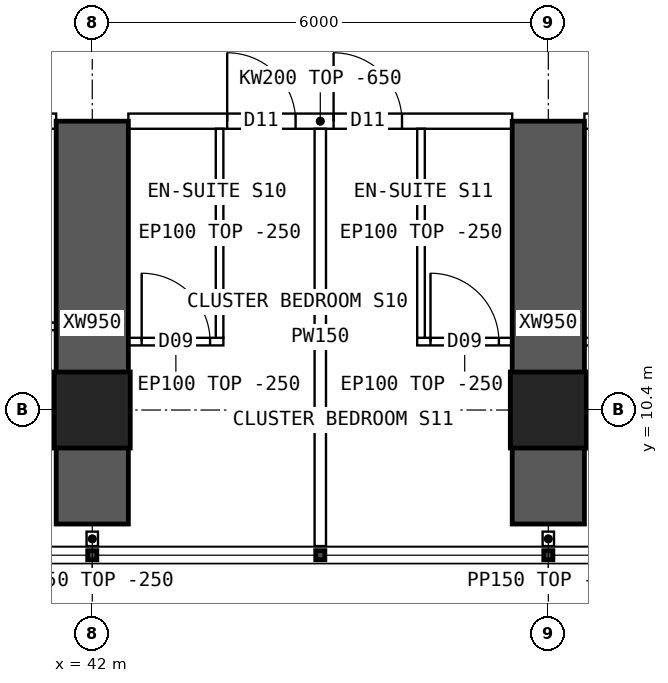
"""IFC4 building model, lengths in metres.
Left out: names, types, materials, properties, quantities, classifications, styles, units other than length and angle.
Written with IfcOpenShell. Run it as: python <this file> out.ifc"""

import sys

from ifc_helpers import new_model, si_unit, direction, frame, frame_2d, origin, origin_2d, place, context, subcontext, project, spatial, polyline, rectangle, hollow_rectangle, outline, extrude, element, fill, save


model = new_model("IFC4")
c1 = context("Model", 3, precision=1e-05, world=origin(), true_north=direction((0.0, 1.0)))
c2 = subcontext(c1, "Body", "Model", "MODEL_VIEW")
j1 = project(units=[si_unit("LENGTHUNIT", "METRE"), si_unit("PLANEANGLEUNIT", "RADIAN")], contexts=[c1])
p1 = place(None, origin())
s1 = spatial("IfcSite", under=j1, at=p1, CompositionType="ELEMENT")
p2 = place(p1, origin())
s2 = spatial("IfcBuilding", under=s1, at=p2, CompositionType="ELEMENT")
p3 = place(p2, frame((0.0, 0.0, 103.15)))
s3 = spatial("IfcBuildingStorey", under=s2, at=p3, CompositionType="ELEMENT", Elevation=103.15)
for number, where, z_axis, x_axis in (
    (1, (42.0, 10.4, 0.0), (0.0, 0.0, 1.0), (1.0, 0.0, 0.0)),
    (2, (48.0, 10.4, 0.0), (0.0, 0.0, 1.0), (1.0, 0.0, 0.0)),
):
    element("IfcColumn", number, at=place(p3, frame(where, z_axis=z_axis, x_axis=x_axis)), inside=s3, PredefinedType="COLUMN", context=c2, shape_type="SweptSolid", body=[
        extrude(hollow_rectangle(XDim=1.0, YDim=1.0, WallThickness=0.1, at=origin_2d()), origin(), (0.0, 0.0, 1.0), 3.75),
    ])
for number, where, z_axis, x_axis in (
    (3, (42.0, 8.9, 0.0), (0.0, 0.0, 1.0), (0.0, 1.0, 0.0)),
    (4, (48.0, 8.9, 0.0), (0.0, 0.0, 1.0), (0.0, 1.0, 0.0)),
):
    element("IfcWall", number, at=place(p3, frame(where, z_axis=z_axis, x_axis=x_axis)), inside=s3, PredefinedType="SHEAR", context=c2, shape_type="SweptSolid", body=[
        extrude(rectangle(XDim=5.3, YDim=0.95, at=frame_2d((2.65, 0.0))), origin(), (0.0, 0.0, 1.0), 3.75),
    ])
p4 = place(p3, frame((36.475, 14.2, 0.0), z_axis=(0.0, 0.0, 1.0), x_axis=(1.0, 0.0, 0.0)))
e5 = element("IfcWall", 5, at=p4, inside=s3, PredefinedType="SOLIDWALL", context=c2, shape_type="SweptSolid", body=[
    extrude(outline(polyline([(0.0, 0.0), (5.05, 0.0), (5.05, 3.1), (0.0, 3.1), (0.0, 0.0)])), frame((0.0, 0.1, 0.0), z_axis=(0.0, -1.0, 0.0), x_axis=(1.0, 0.0, 0.0)), (0.0, 0.0, 1.0), 0.2),
])
p5 = place(p4, frame((0.3, 0.0, 0.0)))
e6 = element("IfcOpeningElement", 6, at=p5, cuts=e5, PredefinedType="OPENING", context=c2, shape_type="SweptSolid", body=[
    extrude(rectangle(XDim=1.0, YDim=2.1, at=frame_2d((0.5, 1.05))), frame((0.0, 0.11, 0.0), z_axis=(0.0, -1.0, 0.0), x_axis=(1.0, 0.0, 0.0)), (0.0, 0.0, 1.0), 0.22),
])
p6 = place(p3, frame((42.475, 14.2, 0.0), z_axis=(0.0, 0.0, 1.0), x_axis=(1.0, 0.0, 0.0)))
e7 = element("IfcWall", 7, at=p6, inside=s3, PredefinedType="SOLIDWALL", context=c2, shape_type="SweptSolid", body=[
    extrude(outline(polyline([(0.0, 0.0), (5.05, 0.0), (5.05, 3.1), (0.0, 3.1), (0.0, 0.0)])), frame((0.0, 0.1, 0.0), z_axis=(0.0, -1.0, 0.0), x_axis=(1.0, 0.0, 0.0)), (0.0, 0.0, 1.0), 0.2),
])
p7 = place(p6, frame((1.3, 0.0, 0.0)))
e8 = element("IfcOpeningElement", 8, at=p7, cuts=e7, PredefinedType="OPENING", context=c2, shape_type="SweptSolid", body=[
    extrude(rectangle(XDim=0.9, YDim=2.1, at=frame_2d((0.45, 1.05))), frame((0.0, 0.11, 0.0), z_axis=(0.0, -1.0, 0.0), x_axis=(1.0, 0.0, 0.0)), (0.0, 0.0, 1.0), 0.22),
])
p8 = place(p6, frame((2.7, 0.0, 0.0)))
e9 = element("IfcOpeningElement", 9, at=p8, cuts=e7, PredefinedType="OPENING", context=c2, shape_type="SweptSolid", body=[
    extrude(rectangle(XDim=0.9, YDim=2.1, at=frame_2d((0.45, 1.05))), frame((0.0, 0.11, 0.0), z_axis=(0.0, -1.0, 0.0), x_axis=(1.0, 0.0, 0.0)), (0.0, 0.0, 1.0), 0.22),
])
p9 = place(p3, frame((48.475, 14.2, 0.0), z_axis=(0.0, 0.0, 1.0), x_axis=(1.0, 0.0, 0.0)))
e10 = element("IfcWall", 10, at=p9, inside=s3, PredefinedType="SOLIDWALL", context=c2, shape_type="SweptSolid", body=[
    extrude(outline(polyline([(0.0, 0.0), (5.05, 0.0), (5.05, 3.1), (0.0, 3.1), (0.0, 0.0)])), frame((0.0, 0.1, 0.0), z_axis=(0.0, -1.0, 0.0), x_axis=(1.0, 0.0, 0.0)), (0.0, 0.0, 1.0), 0.2),
])
p10 = place(p9, frame((1.3, 0.0, 0.0)))
e11 = element("IfcOpeningElement", 11, at=p10, cuts=e10, PredefinedType="OPENING", context=c2, shape_type="SweptSolid", body=[
    extrude(rectangle(XDim=0.9, YDim=2.1, at=frame_2d((0.45, 1.05))), frame((0.0, 0.11, 0.0), z_axis=(0.0, -1.0, 0.0), x_axis=(1.0, 0.0, 0.0)), (0.0, 0.0, 1.0), 0.22),
])
p11 = place(p9, frame((2.7, 0.0, 0.0)))
e12 = element("IfcOpeningElement", 12, at=p11, cuts=e10, PredefinedType="OPENING", context=c2, shape_type="SweptSolid", body=[
    extrude(rectangle(XDim=0.9, YDim=2.1, at=frame_2d((0.45, 1.05))), frame((0.0, 0.11, 0.0), z_axis=(0.0, -1.0, 0.0), x_axis=(1.0, 0.0, 0.0)), (0.0, 0.0, 1.0), 0.22),
])
p12 = place(p3, frame((38.875, 11.5, 0.0), z_axis=(0.0, 0.0, 1.0), x_axis=(1.0, 0.0, 0.0)))
e13 = element("IfcWall", 13, at=p12, inside=s3, PredefinedType="PARTITIONING", context=c2, shape_type="SweptSolid", body=[
    extrude(rectangle(XDim=2.65, YDim=0.1, at=frame_2d((1.325, 0.0))), origin(), (0.0, 0.0, 1.0), 3.5),
])
p13 = place(p3, frame((45.0, 8.61, 0.0), z_axis=(0.0, 0.0, 1.0), x_axis=(0.0, 1.0, 0.0)))
e14 = element("IfcWall", 14, at=p13, inside=s3, PredefinedType="PARTITIONING", context=c2, shape_type="SweptSolid", body=[
    extrude(outline(polyline([(0.0, 0.0), (5.49, 0.0), (5.49, 3.1), (5.442, 3.1), (5.44, 3.5), (1.992, 3.5), (1.99, 3.1), (1.592, 3.1), (1.59, 3.5), (0.0, 3.5), (0.0, 0.0)])), frame((0.0, 0.075, 0.0), z_axis=(0.0, -1.0, 0.0), x_axis=(1.0, 0.0, 0.0)), (0.0, 0.0, 1.0), 0.15),
])
p14 = place(p3, frame((43.725, 11.3, 0.0), z_axis=(0.0, 0.0, 1.0), x_axis=(-1.0, 0.0, 0.0)))
e15 = element("IfcWall", 15, at=p14, inside=s3, PredefinedType="PARTITIONING", context=c2, shape_type="SweptSolid", body=[
    extrude(rectangle(XDim=1.25, YDim=0.1, at=frame_2d((0.625, 0.0))), origin(), (0.0, 0.0, 1.0), 3.5),
])
p15 = place(p14, frame((0.175, 0.0, 0.0)))
e16 = element("IfcOpeningElement", 16, at=p15, cuts=e15, PredefinedType="OPENING", context=c2, shape_type="SweptSolid", body=[
    extrude(rectangle(XDim=0.9, YDim=2.1, at=frame_2d((0.45, 1.05))), frame((0.0, 0.06, 0.0), z_axis=(0.0, -1.0, 0.0), x_axis=(1.0, 0.0, 0.0)), (0.0, 0.0, 1.0), 0.12),
])
p16 = place(p3, frame((43.675, 11.35, 0.0), z_axis=(0.0, 0.0, 1.0), x_axis=(0.0, 1.0, 0.0)))
e17 = element("IfcWall", 17, at=p16, inside=s3, PredefinedType="PARTITIONING", context=c2, shape_type="SweptSolid", body=[
    extrude(outline(polyline([(0.0, 0.0), (2.75, 0.0), (2.75, 3.1), (2.702, 3.1), (2.7, 3.5), (0.0, 3.5), (0.0, 0.0)])), frame((0.0, 0.05, 0.0), z_axis=(0.0, -1.0, 0.0), x_axis=(1.0, 0.0, 0.0)), (0.0, 0.0, 1.0), 0.1),
])
p17 = place(p3, frame((47.525, 11.3, 0.0), z_axis=(0.0, 0.0, 1.0), x_axis=(-1.0, 0.0, 0.0)))
e18 = element("IfcWall", 18, at=p17, inside=s3, PredefinedType="PARTITIONING", context=c2, shape_type="SweptSolid", body=[
    extrude(rectangle(XDim=1.25, YDim=0.1, at=frame_2d((0.625, 0.0))), origin(), (0.0, 0.0, 1.0), 3.5),
])
p18 = place(p17, frame((0.175, 0.0, 0.0)))
e19 = element("IfcOpeningElement", 19, at=p18, cuts=e18, PredefinedType="OPENING", context=c2, shape_type="SweptSolid", body=[
    extrude(rectangle(XDim=0.9, YDim=2.1, at=frame_2d((0.45, 1.05))), frame((0.0, 0.06, 0.0), z_axis=(0.0, -1.0, 0.0), x_axis=(1.0, 0.0, 0.0)), (0.0, 0.0, 1.0), 0.12),
])
p19 = place(p3, frame((46.325, 11.35, 0.0), z_axis=(0.0, 0.0, 1.0), x_axis=(0.0, 1.0, 0.0)))
e20 = element("IfcWall", 20, at=p19, inside=s3, PredefinedType="PARTITIONING", context=c2, shape_type="SweptSolid", body=[
    extrude(outline(polyline([(0.0, 0.0), (2.75, 0.0), (2.75, 3.1), (2.702, 3.1), (2.7, 3.5), (0.0, 3.5), (0.0, 0.0)])), frame((0.0, 0.05, 0.0), z_axis=(0.0, -1.0, 0.0), x_axis=(1.0, 0.0, 0.0)), (0.0, 0.0, 1.0), 0.1),
])
p20 = place(p3, frame((49.725, 11.3, 0.0), z_axis=(0.0, 0.0, 1.0), x_axis=(-1.0, 0.0, 0.0)))
e21 = element("IfcWall", 21, at=p20, inside=s3, PredefinedType="PARTITIONING", context=c2, shape_type="SweptSolid", body=[
    extrude(rectangle(XDim=1.25, YDim=0.1, at=frame_2d((0.625, 0.0))), origin(), (0.0, 0.0, 1.0), 3.5),
])
p21 = place(p20, frame((0.175, 0.0, 0.0)))
e22 = element("IfcOpeningElement", 22, at=p21, cuts=e21, PredefinedType="OPENING", context=c2, shape_type="SweptSolid", body=[
    extrude(rectangle(XDim=0.9, YDim=2.1, at=frame_2d((0.45, 1.05))), frame((0.0, 0.06, 0.0), z_axis=(0.0, -1.0, 0.0), x_axis=(1.0, 0.0, 0.0)), (0.0, 0.0, 1.0), 0.12),
])
for number, where, z_axis, x_axis in (
    (23, (42.0, 8.8, 0.0), (0.0, 0.0, 1.0), (0.0, -1.0, 0.0)),
    (24, (48.0, 8.8, 0.0), (0.0, 0.0, 1.0), (0.0, -1.0, 0.0)),
):
    element("IfcWall", number, at=place(p3, frame(where, z_axis=z_axis, x_axis=x_axis)), inside=s3, PredefinedType="PARTITIONING", context=c2, shape_type="SweptSolid", body=[
        extrude(rectangle(XDim=0.19, YDim=0.15, at=frame_2d((0.095, 0.0))), origin(), (0.0, 0.0, 1.0), 3.5),
    ])
p22 = place(p15, origin())
e25 = element("IfcDoor", 25, at=p22, inside=s3, OperationType="SINGLE_SWING_RIGHT", PredefinedType="DOOR", context=c2, shape_type="SweptSolid", body=[
    extrude(rectangle(XDim=0.9, YDim=2.1, at=frame_2d((0.45, 1.05))), frame((0.0, 0.025, 0.0), z_axis=(0.0, -1.0, 0.0), x_axis=(1.0, 0.0, 0.0)), (0.0, 0.0, 1.0), 0.05),
])
fill(e16, e25)
p23 = place(p7, origin())
e26 = element("IfcDoor", 26, at=p23, inside=s3, OperationType="SINGLE_SWING_LEFT", PredefinedType="DOOR", context=c2, shape_type="SweptSolid", body=[
    extrude(rectangle(XDim=0.9, YDim=2.1, at=frame_2d((0.45, 1.05))), frame((0.0, 0.025, 0.0), z_axis=(0.0, -1.0, 0.0), x_axis=(1.0, 0.0, 0.0)), (0.0, 0.0, 1.0), 0.05),
])
fill(e8, e26)
p24 = place(p18, origin())
e27 = element("IfcDoor", 27, at=p24, inside=s3, OperationType="SINGLE_SWING_RIGHT", PredefinedType="DOOR", context=c2, shape_type="SweptSolid", body=[
    extrude(rectangle(XDim=0.9, YDim=2.1, at=frame_2d((0.45, 1.05))), frame((0.0, 0.025, 0.0), z_axis=(0.0, -1.0, 0.0), x_axis=(1.0, 0.0, 0.0)), (0.0, 0.0, 1.0), 0.05),
])
fill(e19, e27)
p25 = place(p8, origin())
e28 = element("IfcDoor", 28, at=p25, inside=s3, OperationType="SINGLE_SWING_LEFT", PredefinedType="DOOR", context=c2, shape_type="SweptSolid", body=[
    extrude(rectangle(XDim=0.9, YDim=2.1, at=frame_2d((0.45, 1.05))), frame((0.0, 0.025, 0.0), z_axis=(0.0, -1.0, 0.0), x_axis=(1.0, 0.0, 0.0)), (0.0, 0.0, 1.0), 0.05),
])
fill(e9, e28)
save(model, sys.argv[1])
